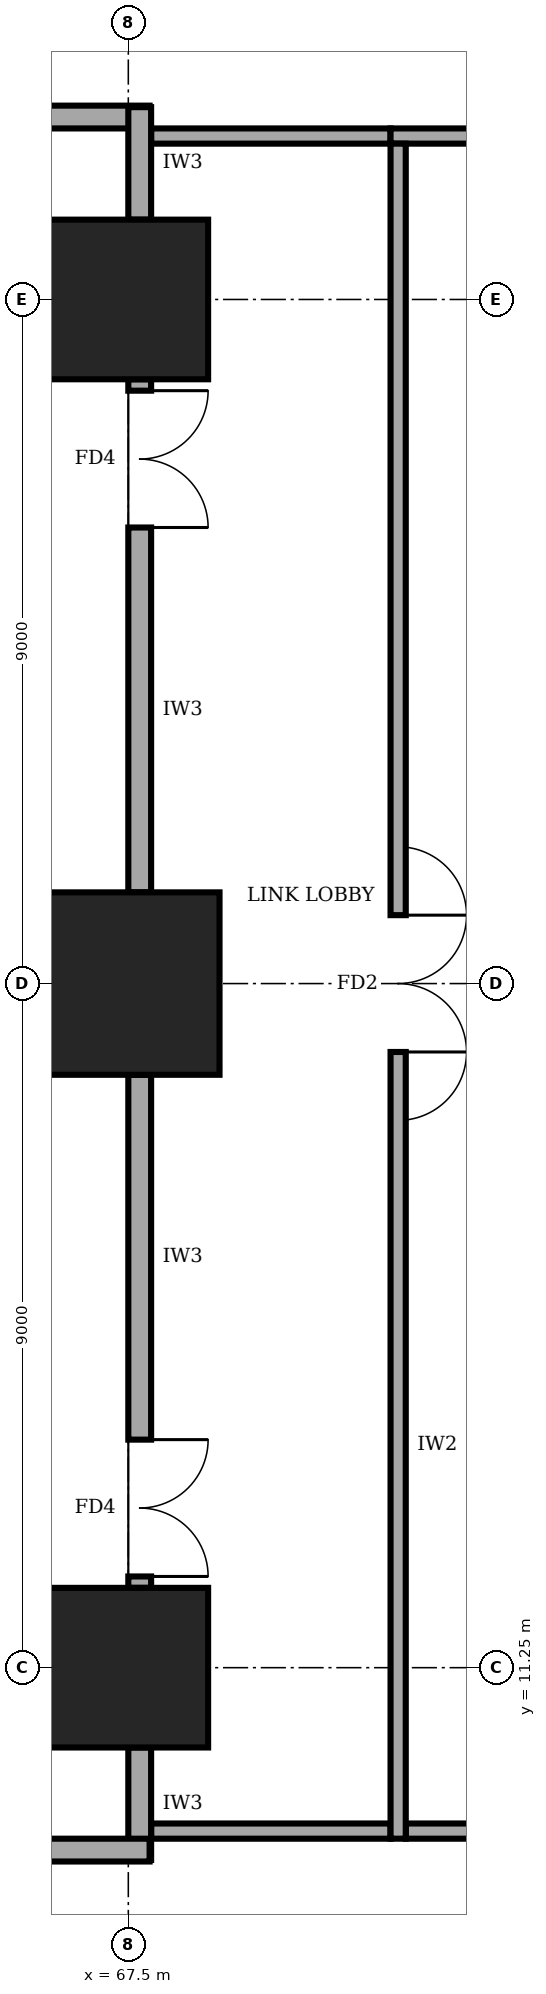
"""IFC4 building model, lengths in metres.
Left out: names, types, materials, properties, quantities, classifications, styles, units other than length and angle.
Written with IfcOpenShell. Run it as: python <this file> out.ifc"""

import sys

from ifc_helpers import new_model, si_unit, direction, frame, frame_2d, origin, origin_2d, place, context, subcontext, project, spatial, rectangle, extrude, element, fill, save


model = new_model("IFC4")
c1 = context("Model", 3, precision=1e-05, world=origin(), true_north=direction((0.0, 1.0)))
c2 = subcontext(c1, "Body", "Model", "MODEL_VIEW")
j1 = project(units=[si_unit("LENGTHUNIT", "METRE"), si_unit("PLANEANGLEUNIT", "RADIAN")], contexts=[c1])
p1 = place(None, origin())
s1 = spatial("IfcSite", under=j1, at=p1, CompositionType="ELEMENT")
p2 = place(p1, origin())
s2 = spatial("IfcBuilding", under=s1, at=p2, CompositionType="ELEMENT")
p3 = place(p2, frame((0.0, 0.0, 117.0)))
s3 = spatial("IfcBuildingStorey", under=s2, at=p3, CompositionType="ELEMENT", Elevation=117.0)
p4 = place(p3, frame((67.5, 11.25, 0.0), z_axis=(0.0, 0.0, 1.0), x_axis=(1.0, 0.0, 0.0)))
e1 = element("IfcColumn", 1, at=p4, inside=s3, PredefinedType="COLUMN", context=c2, shape_type="SweptSolid", body=[
    extrude(rectangle(XDim=2.1, YDim=2.1, at=origin_2d()), origin(), (0.0, 0.0, 1.0), 4.0),
])
p5 = place(p3, frame((67.5, 20.25, 0.0), z_axis=(0.0, 0.0, 1.0), x_axis=(1.0, 0.0, 0.0)))
e2 = element("IfcColumn", 2, at=p5, inside=s3, PredefinedType="COLUMN", context=c2, shape_type="SweptSolid", body=[
    extrude(rectangle(XDim=2.4, YDim=2.4, at=origin_2d()), origin(), (0.0, 0.0, 1.0), 4.0),
])
p6 = place(p3, frame((67.5, 29.25, 0.0), z_axis=(0.0, 0.0, 1.0), x_axis=(1.0, 0.0, 0.0)))
e3 = element("IfcColumn", 3, at=p6, inside=s3, PredefinedType="COLUMN", context=c2, shape_type="SweptSolid", body=[
    extrude(rectangle(XDim=2.1, YDim=2.1, at=origin_2d()), origin(), (0.0, 0.0, 1.0), 4.0),
])
p7 = place(p3, frame((63.02, 31.65, 0.0), z_axis=(0.0, 0.0, 1.0), x_axis=(1.0, 0.0, 0.0)))
e4 = element("IfcWall", 4, at=p7, inside=s3, PredefinedType="SOLIDWALL", context=c2, shape_type="SweptSolid", body=[
    extrude(rectangle(XDim=4.76, YDim=0.3, at=frame_2d((2.38, 0.0))), origin(), (0.0, 0.0, 1.0), 3.75),
])
p8 = place(p3, frame((67.65, 31.78, 0.0), z_axis=(0.0, 0.0, 1.0), x_axis=(0.0, -1.0, 0.0)))
e5 = element("IfcWall", 5, at=p8, inside=s3, PredefinedType="SOLIDWALL", context=c2, shape_type="SweptSolid", body=[
    extrude(rectangle(XDim=1.48, YDim=0.3, at=frame_2d((0.74, 0.0))), origin(), (0.0, 0.0, 1.0), 2.65),
])
p9 = place(p3, frame((67.65, 28.2, 0.0), z_axis=(0.0, 0.0, 1.0), x_axis=(0.0, -1.0, 0.0)))
e6 = element("IfcWall", 6, at=p9, inside=s3, PredefinedType="SOLIDWALL", context=c2, shape_type="SweptSolid", body=[
    extrude(rectangle(XDim=6.75, YDim=0.3, at=frame_2d((3.375, 0.0))), origin(), (0.0, 0.0, 1.0), 2.65),
])
p10 = place(p9, frame((0.15, 0.0, 0.0)))
e7 = element("IfcOpeningElement", 7, at=p10, cuts=e6, PredefinedType="OPENING", context=c2, shape_type="SweptSolid", body=[
    extrude(rectangle(XDim=1.8, YDim=2.1, at=frame_2d((0.9, 1.05))), frame((0.0, 0.16, 0.0), z_axis=(0.0, -1.0, 0.0), x_axis=(1.0, 0.0, 0.0)), (0.0, 0.0, 1.0), 0.32),
])
p11 = place(p3, frame((67.65, 19.05, 0.0), z_axis=(0.0, 0.0, 1.0), x_axis=(0.0, -1.0, 0.0)))
e8 = element("IfcWall", 8, at=p11, inside=s3, PredefinedType="SOLIDWALL", context=c2, shape_type="SweptSolid", body=[
    extrude(rectangle(XDim=6.75, YDim=0.3, at=frame_2d((3.375, 0.0))), origin(), (0.0, 0.0, 1.0), 2.65),
])
p12 = place(p11, frame((4.8, 0.0, 0.0)))
e9 = element("IfcOpeningElement", 9, at=p12, cuts=e8, PredefinedType="OPENING", context=c2, shape_type="SweptSolid", body=[
    extrude(rectangle(XDim=1.8, YDim=2.1, at=frame_2d((0.9, 1.05))), frame((0.0, 0.16, 0.0), z_axis=(0.0, -1.0, 0.0), x_axis=(1.0, 0.0, 0.0)), (0.0, 0.0, 1.0), 0.32),
])
p13 = place(p3, frame((67.65, 10.2, 0.0), z_axis=(0.0, 0.0, 1.0), x_axis=(0.0, -1.0, 0.0)))
e10 = element("IfcWall", 10, at=p13, inside=s3, PredefinedType="SOLIDWALL", context=c2, shape_type="SweptSolid", body=[
    extrude(rectangle(XDim=1.48, YDim=0.3, at=frame_2d((0.74, 0.0))), origin(), (0.0, 0.0, 1.0), 2.65),
])
p14 = place(p3, frame((67.78, 8.85, 0.0), z_axis=(0.0, 0.0, 1.0), x_axis=(-1.0, 0.0, 0.0)))
e11 = element("IfcWall", 11, at=p14, inside=s3, PredefinedType="SOLIDWALL", context=c2, shape_type="SweptSolid", body=[
    extrude(rectangle(XDim=4.76, YDim=0.3, at=frame_2d((2.38, 0.0))), origin(), (0.0, 0.0, 1.0), 3.75),
])
p15 = place(p3, frame((71.15, 9.1, 0.0), z_axis=(0.0, 0.0, 1.0), x_axis=(1.0, 0.0, 0.0)))
e12 = element("IfcWall", 12, at=p15, inside=s3, PredefinedType="SOLIDWALL", context=c2, shape_type="SweptSolid", body=[
    extrude(rectangle(XDim=18.4, YDim=0.2, at=frame_2d((9.2, 0.0))), origin(), (0.0, 0.0, 1.0), 3.75),
])
p16 = place(p15, frame((2.075, 0.0, 0.0)))
e13 = element("IfcOpeningElement", 13, at=p16, cuts=e12, PredefinedType="OPENING", context=c2, shape_type="SweptSolid", body=[
    extrude(rectangle(XDim=1.0, YDim=2.1, at=frame_2d((0.5, 1.05))), frame((0.0, 0.11, 0.0), z_axis=(0.0, -1.0, 0.0), x_axis=(1.0, 0.0, 0.0)), (0.0, 0.0, 1.0), 0.22),
])
p17 = place(p15, frame((9.35, 0.0, 0.0)))
e14 = element("IfcOpeningElement", 14, at=p17, cuts=e12, PredefinedType="OPENING", context=c2, shape_type="SweptSolid", body=[
    extrude(rectangle(XDim=1.0, YDim=2.1, at=frame_2d((0.5, 1.05))), frame((0.0, 0.11, 0.0), z_axis=(0.0, -1.0, 0.0), x_axis=(1.0, 0.0, 0.0)), (0.0, 0.0, 1.0), 0.22),
])
p18 = place(p15, frame((15.875, 0.0, 0.0)))
e15 = element("IfcOpeningElement", 15, at=p18, cuts=e12, PredefinedType="OPENING", context=c2, shape_type="SweptSolid", body=[
    extrude(rectangle(XDim=1.0, YDim=2.1, at=frame_2d((0.5, 1.05))), frame((0.0, 0.11, 0.0), z_axis=(0.0, -1.0, 0.0), x_axis=(1.0, 0.0, 0.0)), (0.0, 0.0, 1.0), 0.22),
])
p19 = place(p3, frame((89.35, 31.4, 0.0), z_axis=(0.0, 0.0, 1.0), x_axis=(-1.0, 0.0, 0.0)))
e16 = element("IfcWall", 16, at=p19, inside=s3, PredefinedType="SOLIDWALL", context=c2, shape_type="SweptSolid", body=[
    extrude(rectangle(XDim=18.4, YDim=0.2, at=frame_2d((9.2, 0.0))), origin(), (0.0, 0.0, 1.0), 3.75),
])
p20 = place(p19, frame((14.725, 0.0, 0.0)))
e17 = element("IfcOpeningElement", 17, at=p20, cuts=e16, PredefinedType="OPENING", context=c2, shape_type="SweptSolid", body=[
    extrude(rectangle(XDim=1.8, YDim=2.1, at=frame_2d((0.9, 1.05))), frame((0.0, 0.11, 0.0), z_axis=(0.0, -1.0, 0.0), x_axis=(1.0, 0.0, 0.0)), (0.0, 0.0, 1.0), 0.22),
])
p21 = place(p19, frame((7.85, 0.0, 0.0)))
e18 = element("IfcOpeningElement", 18, at=p21, cuts=e16, PredefinedType="OPENING", context=c2, shape_type="SweptSolid", body=[
    extrude(rectangle(XDim=1.0, YDim=2.1, at=frame_2d((0.5, 1.05))), frame((0.0, 0.11, 0.0), z_axis=(0.0, -1.0, 0.0), x_axis=(1.0, 0.0, 0.0)), (0.0, 0.0, 1.0), 0.22),
])
p22 = place(p19, frame((1.325, 0.0, 0.0)))
e19 = element("IfcOpeningElement", 19, at=p22, cuts=e16, PredefinedType="OPENING", context=c2, shape_type="SweptSolid", body=[
    extrude(rectangle(XDim=1.0, YDim=2.1, at=frame_2d((0.5, 1.05))), frame((0.0, 0.11, 0.0), z_axis=(0.0, -1.0, 0.0), x_axis=(1.0, 0.0, 0.0)), (0.0, 0.0, 1.0), 0.22),
])
p23 = place(p3, frame((71.05, 31.3, 0.0), z_axis=(0.0, 0.0, 1.0), x_axis=(0.0, -1.0, 0.0)))
e20 = element("IfcWall", 20, at=p23, inside=s3, PredefinedType="SOLIDWALL", context=c2, shape_type="SweptSolid", body=[
    extrude(rectangle(XDim=22.3, YDim=0.2, at=frame_2d((11.15, 0.0))), origin(), (0.0, 0.0, 1.0), 3.75),
])
p24 = place(p23, frame((10.15, 0.0, 0.0)))
e21 = element("IfcOpeningElement", 21, at=p24, cuts=e20, PredefinedType="OPENING", context=c2, shape_type="SweptSolid", body=[
    extrude(rectangle(XDim=1.8, YDim=2.1, at=frame_2d((0.9, 1.05))), frame((0.0, 0.11, 0.0), z_axis=(0.0, -1.0, 0.0), x_axis=(1.0, 0.0, 0.0)), (0.0, 0.0, 1.0), 0.22),
])
for number, where, z_axis, x_axis in (
    (22, (67.8, 9.1, 0.0), (0.0, 0.0, 1.0), (1.0, 0.0, 0.0)),
    (23, (67.8, 31.4, 0.0), (0.0, 0.0, 1.0), (1.0, 0.0, 0.0)),
):
    element("IfcWall", number, at=place(p3, frame(where, z_axis=z_axis, x_axis=x_axis)), inside=s3, PredefinedType="SOLIDWALL", context=c2, shape_type="SweptSolid", body=[
        extrude(rectangle(XDim=3.15, YDim=0.2, at=frame_2d((1.575, 0.0))), origin(), (0.0, 0.0, 1.0), 3.75),
    ])
for number, where, z_axis, x_axis in (
    (24, (63.5, 15.1, 0.0), (0.0, 0.0, 1.0), (1.0, 0.0, 0.0)),
    (25, (63.5, 25.4, 0.0), (0.0, 0.0, 1.0), (1.0, 0.0, 0.0)),
):
    element("IfcWall", number, at=place(p3, frame(where, z_axis=z_axis, x_axis=x_axis)), inside=s3, PredefinedType="SOLIDWALL", context=c2, shape_type="SweptSolid", body=[
        extrude(rectangle(XDim=4.0, YDim=0.2, at=frame_2d((2.0, 0.0))), origin(), (0.0, 0.0, 1.0), 3.75),
    ])
p25 = place(p24, origin())
e26 = element("IfcDoor", 26, at=p25, inside=s3, OperationType="DOUBLE_DOOR_SINGLE_SWING", PredefinedType="DOOR", context=c2, shape_type="SweptSolid", body=[
    extrude(rectangle(XDim=1.8, YDim=2.1, at=frame_2d((0.9, 1.05))), frame((0.0, 0.025, 0.0), z_axis=(0.0, -1.0, 0.0), x_axis=(1.0, 0.0, 0.0)), (0.0, 0.0, 1.0), 0.05),
])
fill(e21, e26)
p26 = place(p10, origin())
e27 = element("IfcDoor", 27, at=p26, inside=s3, OperationType="DOUBLE_DOOR_SINGLE_SWING", PredefinedType="DOOR", context=c2, shape_type="SweptSolid", body=[
    extrude(rectangle(XDim=1.8, YDim=2.1, at=frame_2d((0.9, 1.05))), frame((0.0, 0.025, 0.0), z_axis=(0.0, -1.0, 0.0), x_axis=(1.0, 0.0, 0.0)), (0.0, 0.0, 1.0), 0.05),
])
fill(e7, e27)
p27 = place(p12, origin())
e28 = element("IfcDoor", 28, at=p27, inside=s3, OperationType="DOUBLE_DOOR_SINGLE_SWING", PredefinedType="DOOR", context=c2, shape_type="SweptSolid", body=[
    extrude(rectangle(XDim=1.8, YDim=2.1, at=frame_2d((0.9, 1.05))), frame((0.0, 0.025, 0.0), z_axis=(0.0, -1.0, 0.0), x_axis=(1.0, 0.0, 0.0)), (0.0, 0.0, 1.0), 0.05),
])
fill(e9, e28)
save(model, sys.argv[1])
